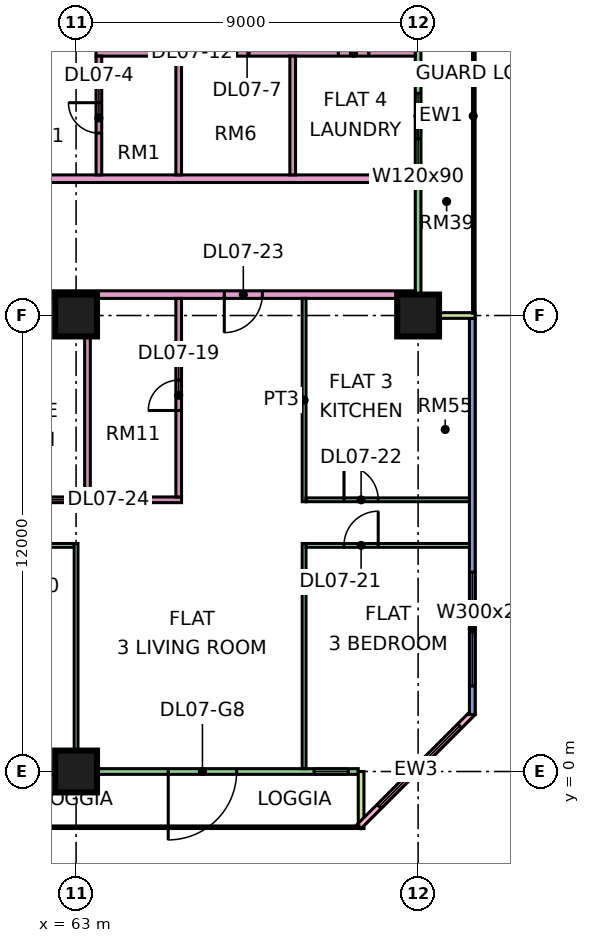
"""IFC4 building model, lengths in metres.
Left out: names, types, materials, properties, quantities, classifications, styles, units other than length and angle.
Written with IfcOpenShell. Run it as: python <this file> out.ifc"""

import sys

from ifc_helpers import new_model, si_unit, direction, frame, frame_2d, origin, origin_2d, place, context, subcontext, project, spatial, rectangle, extrude, element, fill, save


model = new_model("IFC4")
c1 = context("Model", 3, precision=1e-05, world=origin(), true_north=direction((0.0, 1.0)))
c2 = subcontext(c1, "Body", "Model", "MODEL_VIEW")
j1 = project(units=[si_unit("LENGTHUNIT", "METRE"), si_unit("PLANEANGLEUNIT", "RADIAN")], contexts=[c1])
p1 = place(None, origin())
s1 = spatial("IfcSite", under=j1, at=p1, CompositionType="ELEMENT")
p2 = place(p1, origin())
s2 = spatial("IfcBuilding", under=s1, at=p2, CompositionType="ELEMENT")
p3 = place(p2, frame((0.0, 0.0, 41.4)))
s3 = spatial("IfcBuildingStorey", under=s2, at=p3, CompositionType="ELEMENT", Elevation=41.4)
for number, where, z_axis, x_axis in (
    (1, (63.0, 0.0, 0.0), (0.0, 0.0, 1.0), (1.0, 0.0, 0.0)),
    (2, (63.0, 12.0, 0.0), (0.0, 0.0, 1.0), (1.0, 0.0, 0.0)),
    (3, (72.0, 12.0, 0.0), (0.0, 0.0, 1.0), (1.0, 0.0, 0.0)),
):
    element("IfcColumn", number, at=place(p3, frame(where, z_axis=z_axis, x_axis=x_axis)), inside=s3, PredefinedType="COLUMN", context=c2, shape_type="SweptSolid", body=[
        extrude(rectangle(XDim=1.1, YDim=1.1, at=origin_2d()), origin(), (0.0, 0.0, 1.0), 3.75),
    ])
p4 = place(p3, frame((60.075, 0.0, 0.0), z_axis=(0.0, 0.0, 1.0), x_axis=(1.0, 0.0, 0.0)))
e4 = element("IfcWall", 4, at=p4, inside=s3, PredefinedType="SOLIDWALL", context=c2, shape_type="SweptSolid", body=[
    extrude(rectangle(XDim=10.35, YDim=0.15, at=frame_2d((5.175, 0.0))), origin(), (0.0, 0.0, 1.0), 3.35),
])
p5 = place(p4, frame((0.538, 0.0, 0.45)))
e5 = element("IfcOpeningElement", 5, at=p5, cuts=e4, PredefinedType="OPENING", context=c2, shape_type="SweptSolid", body=[
    extrude(rectangle(XDim=1.2, YDim=2.4, at=frame_2d((0.6, 1.2))), frame((0.0, 0.085, 0.0), z_axis=(0.0, -1.0, 0.0), x_axis=(1.0, 0.0, 0.0)), (0.0, 0.0, 1.0), 0.17),
])
p6 = place(p4, frame((5.35, 0.0, 0.0)))
e6 = element("IfcOpeningElement", 6, at=p6, cuts=e4, PredefinedType="OPENING", context=c2, shape_type="SweptSolid", body=[
    extrude(rectangle(XDim=1.8, YDim=2.4, at=frame_2d((0.9, 1.2))), frame((0.0, 0.085, 0.0), z_axis=(0.0, -1.0, 0.0), x_axis=(1.0, 0.0, 0.0)), (0.0, 0.0, 1.0), 0.17),
])
p7 = place(p4, frame((9.188, 0.0, 0.45)))
e7 = element("IfcOpeningElement", 7, at=p7, cuts=e4, PredefinedType="OPENING", context=c2, shape_type="SweptSolid", body=[
    extrude(rectangle(XDim=0.9, YDim=2.4, at=frame_2d((0.45, 1.2))), frame((0.0, 0.085, 0.0), z_axis=(0.0, -1.0, 0.0), x_axis=(1.0, 0.0, 0.0)), (0.0, 0.0, 1.0), 0.17),
])
p8 = place(p3, frame((70.5, -1.5, 0.0), z_axis=(0.0, 0.0, 1.0), x_axis=(0.0, 1.0, 0.0)))
e8 = element("IfcWall", 8, at=p8, inside=s3, PredefinedType="SOLIDWALL", context=c2, shape_type="SweptSolid", body=[
    extrude(rectangle(XDim=1.5, YDim=0.15, at=frame_2d((0.75, 0.0))), origin(), (0.0, 0.0, 1.0), 3.35),
])
p9 = place(p3, frame((70.447, -1.447, 0.0), z_axis=(0.0, 0.0, 1.0), x_axis=(0.707106781187, 0.707106781187, 0.0)))
e9 = element("IfcWall", 9, at=p9, inside=s3, PredefinedType="SOLIDWALL", context=c2, shape_type="SweptSolid", body=[
    extrude(rectangle(XDim=4.243, YDim=0.15, at=frame_2d((2.121, 0.0))), origin(), (0.0, 0.0, 1.0), 3.35),
])
p10 = place(p9, frame((0.744, 0.0, 0.45)))
e10 = element("IfcOpeningElement", 10, at=p10, cuts=e9, PredefinedType="OPENING", context=c2, shape_type="SweptSolid", body=[
    extrude(rectangle(XDim=3.0, YDim=2.4, at=frame_2d((1.5, 1.2))), frame((0.0, 0.085, 0.0), z_axis=(0.0, -1.0, 0.0), x_axis=(1.0, 0.0, 0.0)), (0.0, 0.0, 1.0), 0.17),
])
p11 = place(p3, frame((73.425, 1.5, 0.0), z_axis=(0.0, 0.0, 1.0), x_axis=(0.0, 1.0, 0.0)))
e11 = element("IfcWall", 11, at=p11, inside=s3, PredefinedType="SOLIDWALL", context=c2, shape_type="SweptSolid", body=[
    extrude(rectangle(XDim=10.425, YDim=0.15, at=frame_2d((5.212, 0.0))), origin(), (0.0, 0.0, 1.0), 3.35),
])
p12 = place(p11, frame((0.75, 0.0, 0.45)))
e12 = element("IfcOpeningElement", 12, at=p12, cuts=e11, PredefinedType="OPENING", context=c2, shape_type="SweptSolid", body=[
    extrude(rectangle(XDim=3.0, YDim=2.4, at=frame_2d((1.5, 1.2))), frame((0.0, 0.085, 0.0), z_axis=(0.0, -1.0, 0.0), x_axis=(1.0, 0.0, 0.0)), (0.0, 0.0, 1.0), 0.17),
])
p13 = place(p3, frame((72.0, 12.075, 0.0), z_axis=(0.0, 0.0, 1.0), x_axis=(0.0, 1.0, 0.0)))
e13 = element("IfcWall", 13, at=p13, inside=s3, PredefinedType="SOLIDWALL", context=c2, shape_type="SweptSolid", body=[
    extrude(rectangle(XDim=10.35, YDim=0.15, at=frame_2d((5.175, 0.0))), origin(), (0.0, 0.0, 1.0), 3.35),
])
p14 = place(p13, frame((4.575, 0.0, 1.7)))
e14 = element("IfcOpeningElement", 14, at=p14, cuts=e13, PredefinedType="OPENING", context=c2, shape_type="SweptSolid", body=[
    extrude(rectangle(XDim=1.2, YDim=0.9, at=frame_2d((0.6, 0.45))), frame((0.0, 0.085, 0.0), z_axis=(0.0, -1.0, 0.0), x_axis=(1.0, 0.0, 0.0)), (0.0, 0.0, 1.0), 0.17),
])
p15 = place(p13, frame((8.587, 0.0, 0.45)))
e15 = element("IfcOpeningElement", 15, at=p15, cuts=e13, PredefinedType="OPENING", context=c2, shape_type="SweptSolid", body=[
    extrude(rectangle(XDim=1.2, YDim=2.4, at=frame_2d((0.6, 1.2))), frame((0.0, 0.085, 0.0), z_axis=(0.0, -1.0, 0.0), x_axis=(1.0, 0.0, 0.0)), (0.0, 0.0, 1.0), 0.17),
])
p16 = place(p3, frame((73.5, 12.0, 0.0), z_axis=(0.0, 0.0, 1.0), x_axis=(-1.0, 0.0, 0.0)))
e16 = element("IfcWall", 16, at=p16, inside=s3, PredefinedType="SOLIDWALL", context=c2, shape_type="SweptSolid", body=[
    extrude(rectangle(XDim=1.5, YDim=0.15, at=frame_2d((0.75, 0.0))), origin(), (0.0, 0.0, 1.0), 3.35),
])
p17 = place(p3, frame((40.65, 12.55, 0.0), z_axis=(0.0, 0.0, 1.0), x_axis=(1.0, 0.0, 0.0)))
e17 = element("IfcWall", 17, at=p17, inside=s3, PredefinedType="PARTITIONING", context=c2, shape_type="SweptSolid", body=[
    extrude(rectangle(XDim=31.276, YDim=0.2, at=frame_2d((15.638, 0.0))), origin(), (0.0, 0.0, 1.0), 3.35),
])
p18 = place(p17, frame((17.4, 0.0, 0.0)))
e18 = element("IfcOpeningElement", 18, at=p18, cuts=e17, PredefinedType="OPENING", context=c2, shape_type="SweptSolid", body=[
    extrude(rectangle(XDim=1.0, YDim=2.1, at=frame_2d((0.5, 1.05))), frame((0.0, 0.11, 0.0), z_axis=(0.0, -1.0, 0.0), x_axis=(1.0, 0.0, 0.0)), (0.0, 0.0, 1.0), 0.22),
])
p19 = place(p17, frame((26.25, 0.0, 0.0)))
e19 = element("IfcOpeningElement", 19, at=p19, cuts=e17, PredefinedType="OPENING", context=c2, shape_type="SweptSolid", body=[
    extrude(rectangle(XDim=1.0, YDim=2.1, at=frame_2d((0.5, 1.05))), frame((0.0, 0.11, 0.0), z_axis=(0.0, -1.0, 0.0), x_axis=(1.0, 0.0, 0.0)), (0.0, 0.0, 1.0), 0.22),
])
p20 = place(p17, frame((1.05, 0.0, 0.0)))
e20 = element("IfcOpeningElement", 20, at=p20, cuts=e17, PredefinedType="OPENING", context=c2, shape_type="SweptSolid", body=[
    extrude(rectangle(XDim=1.0, YDim=2.1, at=frame_2d((0.5, 1.05))), frame((0.0, 0.11, 0.0), z_axis=(0.0, -1.0, 0.0), x_axis=(1.0, 0.0, 0.0)), (0.0, 0.0, 1.0), 0.22),
])
p21 = place(p3, frame((51.225, 15.6, 0.0), z_axis=(0.0, 0.0, 1.0), x_axis=(1.0, 0.0, 0.0)))
e21 = element("IfcWall", 21, at=p21, inside=s3, PredefinedType="PARTITIONING", context=c2, shape_type="SweptSolid", body=[
    extrude(rectangle(XDim=20.701, YDim=0.2, at=frame_2d((10.351, 0.0))), origin(), (0.0, 0.0, 1.0), 3.35),
])
p22 = place(p21, frame((9.875, 0.0, 0.0)))
e22 = element("IfcOpeningElement", 22, at=p22, cuts=e21, PredefinedType="OPENING", context=c2, shape_type="SweptSolid", body=[
    extrude(rectangle(XDim=1.0, YDim=2.1, at=frame_2d((0.5, 1.05))), frame((0.0, 0.11, 0.0), z_axis=(0.0, -1.0, 0.0), x_axis=(1.0, 0.0, 0.0)), (0.0, 0.0, 1.0), 0.22),
])
p23 = place(p21, frame((0.875, 0.0, 0.0)))
e23 = element("IfcOpeningElement", 23, at=p23, cuts=e21, PredefinedType="OPENING", context=c2, shape_type="SweptSolid", body=[
    extrude(rectangle(XDim=1.0, YDim=2.1, at=frame_2d((0.5, 1.05))), frame((0.0, 0.11, 0.0), z_axis=(0.0, -1.0, 0.0), x_axis=(1.0, 0.0, 0.0)), (0.0, 0.0, 1.0), 0.22),
])
p24 = place(p3, frame((60.1, 5.95, 0.0), z_axis=(0.0, 0.0, 1.0), x_axis=(1.0, 0.0, 0.0)))
e24 = element("IfcWall", 24, at=p24, inside=s3, PredefinedType="PARTITIONING", context=c2, shape_type="SweptSolid", body=[
    extrude(rectangle(XDim=2.85, YDim=0.1, at=frame_2d((1.425, 0.0))), origin(), (0.0, 0.0, 1.0), 3.35),
])
p25 = place(p24, frame((0.95, 0.0, 0.0)))
e25 = element("IfcOpeningElement", 25, at=p25, cuts=e24, PredefinedType="OPENING", context=c2, shape_type="SweptSolid", body=[
    extrude(rectangle(XDim=0.9, YDim=2.1, at=frame_2d((0.45, 1.05))), frame((0.0, 0.06, 0.0), z_axis=(0.0, -1.0, 0.0), x_axis=(1.0, 0.0, 0.0)), (0.0, 0.0, 1.0), 0.12),
])
p26 = place(p3, frame((60.1, 7.15, 0.0), z_axis=(0.0, 0.0, 1.0), x_axis=(1.0, 0.0, 0.0)))
e26 = element("IfcWall", 26, at=p26, inside=s3, PredefinedType="PARTITIONING", context=c2, shape_type="SweptSolid", body=[
    extrude(rectangle(XDim=5.675, YDim=0.15, at=frame_2d((2.837, 0.0))), origin(), (0.0, 0.0, 1.0), 3.35),
])
p27 = place(p26, frame((1.1, 0.0, 0.0)))
e27 = element("IfcOpeningElement", 27, at=p27, cuts=e26, PredefinedType="OPENING", context=c2, shape_type="SweptSolid", body=[
    extrude(rectangle(XDim=0.9, YDim=2.1, at=frame_2d((0.45, 1.05))), frame((0.0, 0.085, 0.0), z_axis=(0.0, -1.0, 0.0), x_axis=(1.0, 0.0, 0.0)), (0.0, 0.0, 1.0), 0.17),
])
p28 = place(p3, frame((63.0, 0.074, 0.0), z_axis=(0.0, 0.0, 1.0), x_axis=(0.0, 1.0, 0.0)))
e28 = element("IfcWall", 28, at=p28, inside=s3, PredefinedType="PARTITIONING", context=c2, shape_type="SweptSolid", body=[
    extrude(rectangle(XDim=5.926, YDim=0.1, at=frame_2d((2.963, 0.0))), origin(), (0.0, 0.0, 1.0), 3.35),
])
p29 = place(p3, frame((63.3, 7.225, 0.0), z_axis=(0.0, 0.0, 1.0), x_axis=(0.0, 1.0, 0.0)))
e29 = element("IfcWall", 29, at=p29, inside=s3, PredefinedType="PARTITIONING", context=c2, shape_type="SweptSolid", body=[
    extrude(rectangle(XDim=5.225, YDim=0.15, at=frame_2d((2.612, 0.0))), origin(), (0.0, 0.0, 1.0), 3.35),
])
p30 = place(p3, frame((63.525, 18.9, 0.0), z_axis=(0.0, 0.0, 1.0), x_axis=(1.0, 0.0, 0.0)))
e30 = element("IfcWall", 30, at=p30, inside=s3, PredefinedType="PARTITIONING", context=c2, shape_type="SweptSolid", body=[
    extrude(rectangle(XDim=8.401, YDim=0.15, at=frame_2d((4.201, 0.0))), origin(), (0.0, 0.0, 1.0), 3.35),
])
p31 = place(p30, frame((6.375, 0.0, 0.0)))
e31 = element("IfcOpeningElement", 31, at=p31, cuts=e30, PredefinedType="OPENING", context=c2, shape_type="SweptSolid", body=[
    extrude(rectangle(XDim=0.8, YDim=2.1, at=frame_2d((0.4, 1.05))), frame((0.0, 0.085, 0.0), z_axis=(0.0, -1.0, 0.0), x_axis=(1.0, 0.0, 0.0)), (0.0, 0.0, 1.0), 0.17),
])
p32 = place(p30, frame((3.225, 0.0, 0.0)))
e32 = element("IfcOpeningElement", 32, at=p32, cuts=e30, PredefinedType="OPENING", context=c2, shape_type="SweptSolid", body=[
    extrude(rectangle(XDim=0.8, YDim=2.1, at=frame_2d((0.4, 1.05))), frame((0.0, 0.085, 0.0), z_axis=(0.0, -1.0, 0.0), x_axis=(1.0, 0.0, 0.0)), (0.0, 0.0, 1.0), 0.17),
])
p33 = place(p3, frame((63.6, 15.7, 0.0), z_axis=(0.0, 0.0, 1.0), x_axis=(0.0, 1.0, 0.0)))
e33 = element("IfcWall", 33, at=p33, inside=s3, PredefinedType="PARTITIONING", context=c2, shape_type="SweptSolid", body=[
    extrude(rectangle(XDim=3.125, YDim=0.15, at=frame_2d((1.562, 0.0))), origin(), (0.0, 0.0, 1.0), 3.35),
])
p34 = place(p33, frame((1.1, 0.0, 0.0)))
e34 = element("IfcOpeningElement", 34, at=p34, cuts=e33, PredefinedType="OPENING", context=c2, shape_type="SweptSolid", body=[
    extrude(rectangle(XDim=0.8, YDim=2.1, at=frame_2d((0.4, 1.05))), frame((0.0, 0.085, 0.0), z_axis=(0.0, -1.0, 0.0), x_axis=(1.0, 0.0, 0.0)), (0.0, 0.0, 1.0), 0.17),
])
p35 = place(p3, frame((65.7, 7.225, 0.0), z_axis=(0.0, 0.0, 1.0), x_axis=(0.0, 1.0, 0.0)))
e35 = element("IfcWall", 35, at=p35, inside=s3, PredefinedType="PARTITIONING", context=c2, shape_type="SweptSolid", body=[
    extrude(rectangle(XDim=5.225, YDim=0.15, at=frame_2d((2.612, 0.0))), origin(), (0.0, 0.0, 1.0), 3.35),
])
p36 = place(p35, frame((2.275, 0.0, 0.0)))
e36 = element("IfcOpeningElement", 36, at=p36, cuts=e35, PredefinedType="OPENING", context=c2, shape_type="SweptSolid", body=[
    extrude(rectangle(XDim=0.8, YDim=2.1, at=frame_2d((0.4, 1.05))), frame((0.0, 0.085, 0.0), z_axis=(0.0, -1.0, 0.0), x_axis=(1.0, 0.0, 0.0)), (0.0, 0.0, 1.0), 0.17),
])
for number, where, z_axis, x_axis in (
    (37, (65.7, 15.7, 0.0), (0.0, 0.0, 1.0), (0.0, 1.0, 0.0)),
    (38, (68.7, 15.7, 0.0), (0.0, 0.0, 1.0), (0.0, 1.0, 0.0)),
):
    element("IfcWall", number, at=place(p3, frame(where, z_axis=z_axis, x_axis=x_axis)), inside=s3, PredefinedType="PARTITIONING", context=c2, shape_type="SweptSolid", body=[
        extrude(rectangle(XDim=3.125, YDim=0.15, at=frame_2d((1.562, 0.0))), origin(), (0.0, 0.0, 1.0), 3.35),
    ])
p37 = place(p3, frame((69.0, 0.074, 0.0), z_axis=(0.0, 0.0, 1.0), x_axis=(0.0, 1.0, 0.0)))
e39 = element("IfcWall", 39, at=p37, inside=s3, PredefinedType="PARTITIONING", context=c2, shape_type="SweptSolid", body=[
    extrude(rectangle(XDim=5.926, YDim=0.1, at=frame_2d((2.963, 0.0))), origin(), (0.0, 0.0, 1.0), 3.35),
])
p38 = place(p3, frame((69.0, 7.1, 0.0), z_axis=(0.0, 0.0, 1.0), x_axis=(0.0, 1.0, 0.0)))
e40 = element("IfcWall", 40, at=p38, inside=s3, PredefinedType="PARTITIONING", context=c2, shape_type="SweptSolid", body=[
    extrude(rectangle(XDim=5.35, YDim=0.1, at=frame_2d((2.675, 0.0))), origin(), (0.0, 0.0, 1.0), 3.35),
])
p39 = place(p3, frame((69.05, 5.95, 0.0), z_axis=(0.0, 0.0, 1.0), x_axis=(1.0, 0.0, 0.0)))
e41 = element("IfcWall", 41, at=p39, inside=s3, PredefinedType="PARTITIONING", context=c2, shape_type="SweptSolid", body=[
    extrude(rectangle(XDim=4.3, YDim=0.1, at=frame_2d((2.15, 0.0))), origin(), (0.0, 0.0, 1.0), 3.35),
])
p40 = place(p39, frame((1.0, 0.0, 0.0)))
e42 = element("IfcOpeningElement", 42, at=p40, cuts=e41, PredefinedType="OPENING", context=c2, shape_type="SweptSolid", body=[
    extrude(rectangle(XDim=0.9, YDim=2.1, at=frame_2d((0.45, 1.05))), frame((0.0, 0.06, 0.0), z_axis=(0.0, -1.0, 0.0), x_axis=(1.0, 0.0, 0.0)), (0.0, 0.0, 1.0), 0.12),
])
p41 = place(p3, frame((69.05, 7.15, 0.0), z_axis=(0.0, 0.0, 1.0), x_axis=(1.0, 0.0, 0.0)))
e43 = element("IfcWall", 43, at=p41, inside=s3, PredefinedType="PARTITIONING", context=c2, shape_type="SweptSolid", body=[
    extrude(rectangle(XDim=4.3, YDim=0.1, at=frame_2d((2.15, 0.0))), origin(), (0.0, 0.0, 1.0), 3.35),
])
p42 = place(p41, frame((1.0, 0.0, 0.0)))
e44 = element("IfcOpeningElement", 44, at=p42, cuts=e43, PredefinedType="OPENING", context=c2, shape_type="SweptSolid", body=[
    extrude(rectangle(XDim=0.9, YDim=2.1, at=frame_2d((0.45, 1.05))), frame((0.0, 0.06, 0.0), z_axis=(0.0, -1.0, 0.0), x_axis=(1.0, 0.0, 0.0)), (0.0, 0.0, 1.0), 0.12),
])
p43 = place(p6, frame((1.8, 0.0, 0.0), z_axis=(0.0, 0.0, 1.0), x_axis=(-1.0, 0.0, 0.0)))
e45 = element("IfcDoor", 45, at=p43, inside=s3, OperationType="DOUBLE_DOOR_SINGLE_SWING", PredefinedType="DOOR", context=c2, shape_type="SweptSolid", body=[
    extrude(rectangle(XDim=1.8, YDim=2.4, at=frame_2d((0.9, 1.2))), frame((0.0, 0.025, 0.0), z_axis=(0.0, -1.0, 0.0), x_axis=(1.0, 0.0, 0.0)), (0.0, 0.0, 1.0), 0.05),
])
fill(e6, e45)
p44 = place(p7, origin())
e46 = element("IfcWindow", 46, at=p44, inside=s3, PartitioningType="SINGLE_PANEL", PredefinedType="WINDOW", context=c2, shape_type="SweptSolid", body=[
    extrude(rectangle(XDim=0.9, YDim=2.4, at=frame_2d((0.45, 1.2))), frame((0.0, 0.03, 0.0), z_axis=(0.0, -1.0, 0.0), x_axis=(1.0, 0.0, 0.0)), (0.0, 0.0, 1.0), 0.06),
])
fill(e7, e46)
p45 = place(p10, origin())
e47 = element("IfcWindow", 47, at=p45, inside=s3, PartitioningType="SINGLE_PANEL", PredefinedType="WINDOW", context=c2, shape_type="SweptSolid", body=[
    extrude(rectangle(XDim=3.0, YDim=2.4, at=frame_2d((1.5, 1.2))), frame((0.0, 0.03, 0.0), z_axis=(0.0, -1.0, 0.0), x_axis=(1.0, 0.0, 0.0)), (0.0, 0.0, 1.0), 0.06),
])
fill(e10, e47)
p46 = place(p12, origin())
e48 = element("IfcWindow", 48, at=p46, inside=s3, PartitioningType="SINGLE_PANEL", PredefinedType="WINDOW", context=c2, shape_type="SweptSolid", body=[
    extrude(rectangle(XDim=3.0, YDim=2.4, at=frame_2d((1.5, 1.2))), frame((0.0, 0.03, 0.0), z_axis=(0.0, -1.0, 0.0), x_axis=(1.0, 0.0, 0.0)), (0.0, 0.0, 1.0), 0.06),
])
fill(e12, e48)
p47 = place(p14, origin())
e49 = element("IfcWindow", 49, at=p47, inside=s3, PartitioningType="SINGLE_PANEL", PredefinedType="WINDOW", context=c2, shape_type="SweptSolid", body=[
    extrude(rectangle(XDim=1.2, YDim=0.9, at=frame_2d((0.6, 0.45))), frame((0.0, 0.03, 0.0), z_axis=(0.0, -1.0, 0.0), x_axis=(1.0, 0.0, 0.0)), (0.0, 0.0, 1.0), 0.06),
])
fill(e14, e49)
p48 = place(p34, frame((0.8, 0.0, 0.0), z_axis=(0.0, 0.0, 1.0), x_axis=(-1.0, 0.0, 0.0)))
e50 = element("IfcDoor", 50, at=p48, inside=s3, OperationType="SINGLE_SWING_RIGHT", PredefinedType="DOOR", context=c2, shape_type="SweptSolid", body=[
    extrude(rectangle(XDim=0.8, YDim=2.1, at=frame_2d((0.4, 1.05))), frame((0.0, 0.025, 0.0), z_axis=(0.0, -1.0, 0.0), x_axis=(1.0, 0.0, 0.0)), (0.0, 0.0, 1.0), 0.05),
])
fill(e34, e50)
p49 = place(p31, frame((0.8, 0.0, 0.0), z_axis=(0.0, 0.0, 1.0), x_axis=(-1.0, 0.0, 0.0)))
e51 = element("IfcDoor", 51, at=p49, inside=s3, OperationType="SINGLE_SWING_RIGHT", PredefinedType="DOOR", context=c2, shape_type="SweptSolid", body=[
    extrude(rectangle(XDim=0.8, YDim=2.1, at=frame_2d((0.4, 1.05))), frame((0.0, 0.025, 0.0), z_axis=(0.0, -1.0, 0.0), x_axis=(1.0, 0.0, 0.0)), (0.0, 0.0, 1.0), 0.05),
])
fill(e31, e51)
p50 = place(p32, frame((0.8, 0.0, 0.0), z_axis=(0.0, 0.0, 1.0), x_axis=(-1.0, 0.0, 0.0)))
e52 = element("IfcDoor", 52, at=p50, inside=s3, OperationType="SINGLE_SWING_RIGHT", PredefinedType="DOOR", context=c2, shape_type="SweptSolid", body=[
    extrude(rectangle(XDim=0.8, YDim=2.1, at=frame_2d((0.4, 1.05))), frame((0.0, 0.025, 0.0), z_axis=(0.0, -1.0, 0.0), x_axis=(1.0, 0.0, 0.0)), (0.0, 0.0, 1.0), 0.05),
])
fill(e32, e52)
p51 = place(p36, origin())
e53 = element("IfcDoor", 53, at=p51, inside=s3, OperationType="SINGLE_SWING_LEFT", PredefinedType="DOOR", context=c2, shape_type="SweptSolid", body=[
    extrude(rectangle(XDim=0.8, YDim=2.1, at=frame_2d((0.4, 1.05))), frame((0.0, 0.025, 0.0), z_axis=(0.0, -1.0, 0.0), x_axis=(1.0, 0.0, 0.0)), (0.0, 0.0, 1.0), 0.05),
])
fill(e36, e53)
p52 = place(p40, frame((0.9, 0.0, 0.0), z_axis=(0.0, 0.0, 1.0), x_axis=(-1.0, 0.0, 0.0)))
e54 = element("IfcDoor", 54, at=p52, inside=s3, OperationType="SINGLE_SWING_RIGHT", PredefinedType="DOOR", context=c2, shape_type="SweptSolid", body=[
    extrude(rectangle(XDim=0.9, YDim=2.1, at=frame_2d((0.45, 1.05))), frame((0.0, 0.025, 0.0), z_axis=(0.0, -1.0, 0.0), x_axis=(1.0, 0.0, 0.0)), (0.0, 0.0, 1.0), 0.05),
])
fill(e42, e54)
p53 = place(p42, origin())
e55 = element("IfcDoor", 55, at=p53, inside=s3, OperationType="SINGLE_SWING_LEFT", PredefinedType="DOOR", context=c2, shape_type="SweptSolid", body=[
    extrude(rectangle(XDim=0.9, YDim=2.1, at=frame_2d((0.45, 1.05))), frame((0.0, 0.025, 0.0), z_axis=(0.0, -1.0, 0.0), x_axis=(1.0, 0.0, 0.0)), (0.0, 0.0, 1.0), 0.05),
])
fill(e44, e55)
p54 = place(p19, frame((1.0, 0.0, 0.0), z_axis=(0.0, 0.0, 1.0), x_axis=(-1.0, 0.0, 0.0)))
e56 = element("IfcDoor", 56, at=p54, inside=s3, OperationType="SINGLE_SWING_LEFT", PredefinedType="DOOR", context=c2, shape_type="SweptSolid", body=[
    extrude(rectangle(XDim=1.0, YDim=2.1, at=frame_2d((0.5, 1.05))), frame((0.0, 0.025, 0.0), z_axis=(0.0, -1.0, 0.0), x_axis=(1.0, 0.0, 0.0)), (0.0, 0.0, 1.0), 0.05),
])
fill(e19, e56)
save(model, sys.argv[1])
